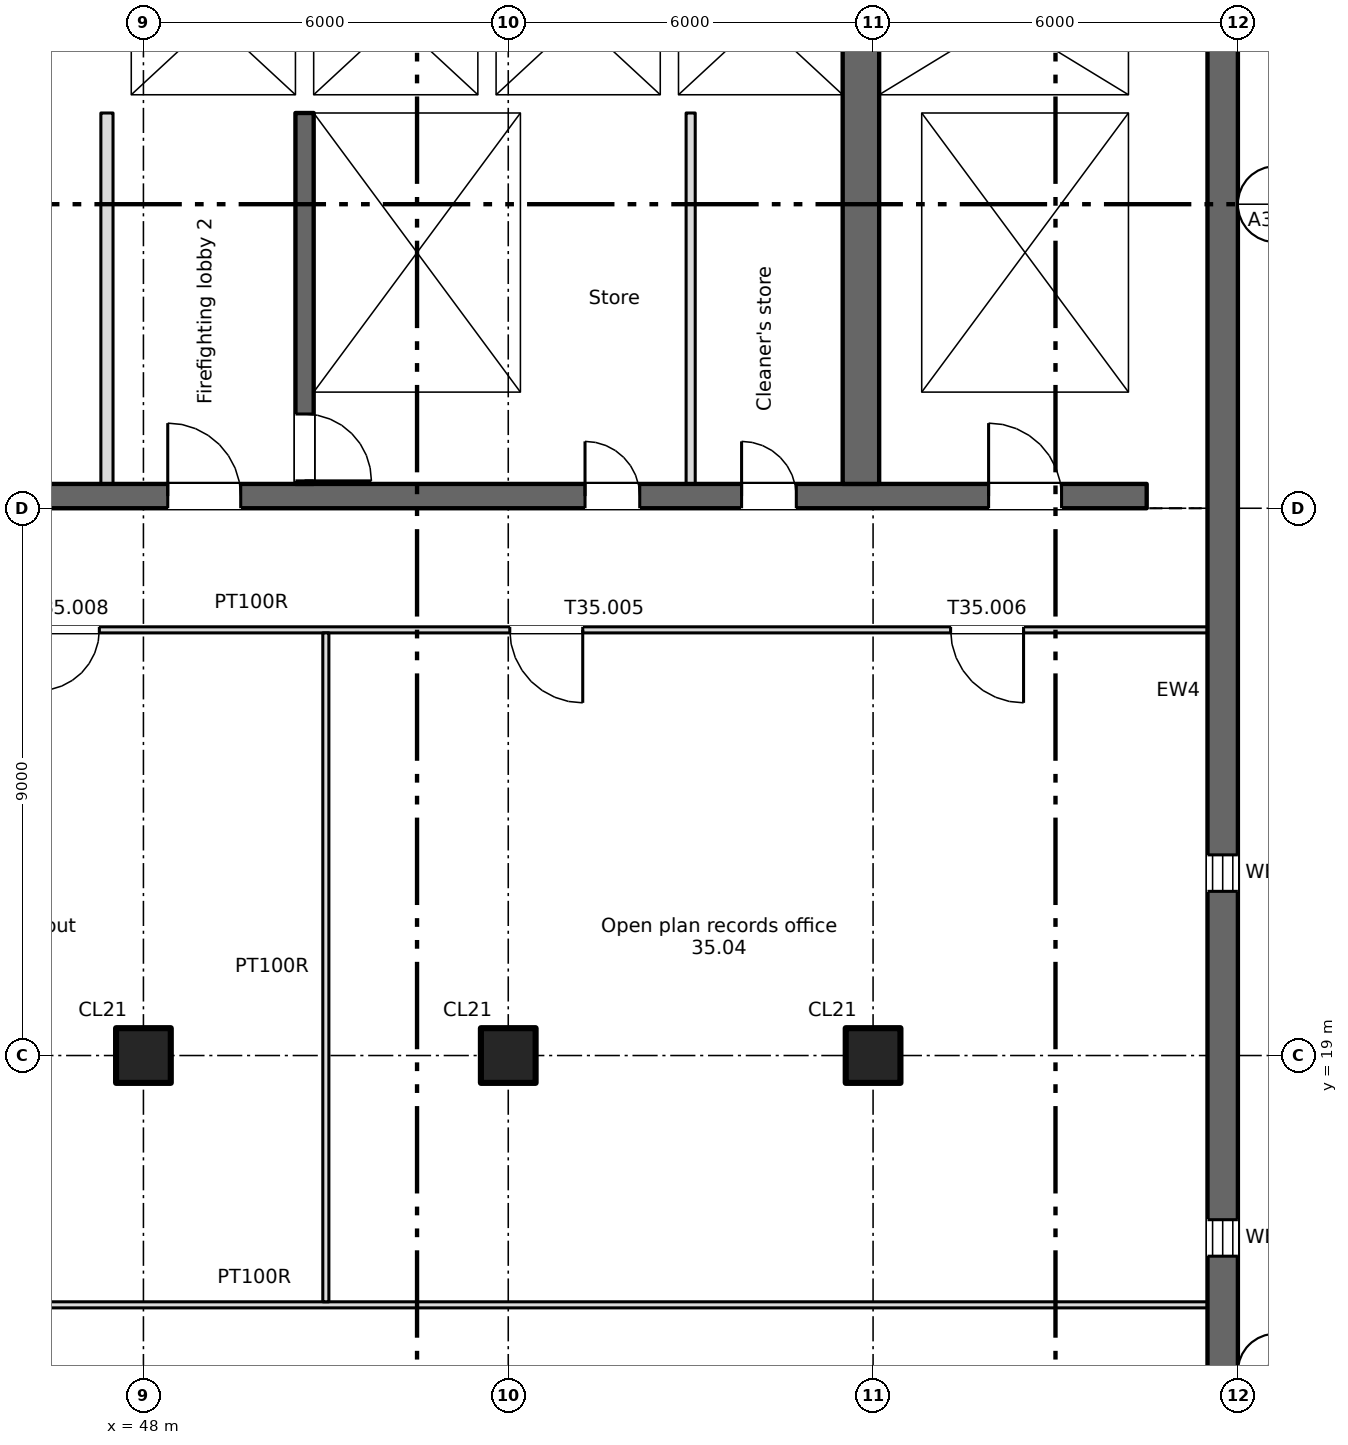
"""IFC4 building model, lengths in metres.
Left out: names, types, materials, properties, quantities, classifications, styles, units other than length and angle.
Written with IfcOpenShell. Run it as: python <this file> out.ifc"""

import sys

from ifc_helpers import new_model, si_unit, direction, frame, frame_2d, origin, origin_2d, place, context, subcontext, project, spatial, rectangle, extrude, element, fill, save


model = new_model("IFC4")
c1 = context("Model", 3, precision=1e-05, world=origin(), true_north=direction((0.0, 1.0)))
c2 = subcontext(c1, "Body", "Model", "MODEL_VIEW")
j1 = project(units=[si_unit("LENGTHUNIT", "METRE"), si_unit("PLANEANGLEUNIT", "RADIAN")], contexts=[c1])
p1 = place(None, origin())
s1 = spatial("IfcSite", under=j1, at=p1, CompositionType="ELEMENT")
p2 = place(p1, origin())
s2 = spatial("IfcBuilding", under=s1, at=p2, CompositionType="ELEMENT")
p3 = place(p2, frame((0.0, 0.0, 243.15)))
s3 = spatial("IfcBuildingStorey", under=s2, at=p3, CompositionType="ELEMENT", Elevation=243.15)
for number, where, z_axis, x_axis in (
    (1, (48.0, 19.0, 0.0), (0.0, 0.0, 1.0), (1.0, 0.0, 0.0)),
    (2, (54.0, 19.0, 0.0), (0.0, 0.0, 1.0), (1.0, 0.0, 0.0)),
    (3, (60.0, 19.0, 0.0), (0.0, 0.0, 1.0), (1.0, 0.0, 0.0)),
):
    element("IfcColumn", number, at=place(p3, frame(where, z_axis=z_axis, x_axis=x_axis)), inside=s3, PredefinedType="COLUMN", context=c2, shape_type="SweptSolid", body=[
        extrude(rectangle(XDim=0.9, YDim=0.9, at=origin_2d()), origin(), (0.0, 0.0, 1.0), 3.4),
    ])
p4 = place(p3, frame((65.75, 8.5, 0.0), z_axis=(0.0, 0.0, 1.0), x_axis=(0.0, 1.0, 0.0)))
e4 = element("IfcWall", 4, at=p4, inside=s3, PredefinedType="SHEAR", context=c2, shape_type="SweptSolid", body=[
    extrude(rectangle(XDim=33.0, YDim=0.5, at=frame_2d((16.5, 0.0))), origin(), (0.0, 0.0, 1.0), 3.4),
])
p5 = place(p4, frame((1.2, 0.0, 0.6)))
e5 = element("IfcOpeningElement", 5, at=p5, cuts=e4, PredefinedType="OPENING", context=c2, shape_type="SweptSolid", body=[
    extrude(rectangle(XDim=0.6, YDim=2.4, at=frame_2d((0.3, 1.2))), frame((0.0, 0.26, 0.0), z_axis=(0.0, -1.0, 0.0), x_axis=(1.0, 0.0, 0.0)), (0.0, 0.0, 1.0), 0.52),
])
p6 = place(p4, frame((7.2, 0.0, 0.6)))
e6 = element("IfcOpeningElement", 6, at=p6, cuts=e4, PredefinedType="OPENING", context=c2, shape_type="SweptSolid", body=[
    extrude(rectangle(XDim=0.6, YDim=2.4, at=frame_2d((0.3, 1.2))), frame((0.0, 0.26, 0.0), z_axis=(0.0, -1.0, 0.0), x_axis=(1.0, 0.0, 0.0)), (0.0, 0.0, 1.0), 0.52),
])
p7 = place(p4, frame((13.2, 0.0, 0.6)))
e7 = element("IfcOpeningElement", 7, at=p7, cuts=e4, PredefinedType="OPENING", context=c2, shape_type="SweptSolid", body=[
    extrude(rectangle(XDim=0.6, YDim=2.4, at=frame_2d((0.3, 1.2))), frame((0.0, 0.26, 0.0), z_axis=(0.0, -1.0, 0.0), x_axis=(1.0, 0.0, 0.0)), (0.0, 0.0, 1.0), 0.52),
])
p8 = place(p3, frame((6.5, 28.2, 0.0), z_axis=(0.0, 0.0, 1.0), x_axis=(1.0, 0.0, 0.0)))
e8 = element("IfcWall", 8, at=p8, inside=s3, PredefinedType="SHEAR", context=c2, shape_type="SweptSolid", body=[
    extrude(rectangle(XDim=58.0, YDim=0.4, at=frame_2d((29.0, 0.0))), origin(), (0.0, 0.0, 1.0), 3.4),
])
p9 = place(p8, frame((14.05, 0.0, 0.0)))
e9 = element("IfcOpeningElement", 9, at=p9, cuts=e8, PredefinedType="OPENING", context=c2, shape_type="SweptSolid", body=[
    extrude(rectangle(XDim=0.9, YDim=2.1, at=frame_2d((0.45, 1.05))), frame((0.0, 0.21, 0.0), z_axis=(0.0, -1.0, 0.0), x_axis=(1.0, 0.0, 0.0)), (0.0, 0.0, 1.0), 0.42),
])
p10 = place(p8, frame((48.762, 0.0, 0.0)))
e10 = element("IfcOpeningElement", 10, at=p10, cuts=e8, PredefinedType="OPENING", context=c2, shape_type="SweptSolid", body=[
    extrude(rectangle(XDim=0.9, YDim=2.1, at=frame_2d((0.45, 1.05))), frame((0.0, 0.21, 0.0), z_axis=(0.0, -1.0, 0.0), x_axis=(1.0, 0.0, 0.0)), (0.0, 0.0, 1.0), 0.42),
])
p11 = place(p8, frame((51.337, 0.0, 0.0)))
e11 = element("IfcOpeningElement", 11, at=p11, cuts=e8, PredefinedType="OPENING", context=c2, shape_type="SweptSolid", body=[
    extrude(rectangle(XDim=0.9, YDim=2.1, at=frame_2d((0.45, 1.05))), frame((0.0, 0.21, 0.0), z_axis=(0.0, -1.0, 0.0), x_axis=(1.0, 0.0, 0.0)), (0.0, 0.0, 1.0), 0.42),
])
p12 = place(p8, frame((1.55, 0.0, 0.0)))
e12 = element("IfcOpeningElement", 12, at=p12, cuts=e8, PredefinedType="OPENING", context=c2, shape_type="SweptSolid", body=[
    extrude(rectangle(XDim=0.9, YDim=2.1, at=frame_2d((0.45, 1.05))), frame((0.0, 0.21, 0.0), z_axis=(0.0, -1.0, 0.0), x_axis=(1.0, 0.0, 0.0)), (0.0, 0.0, 1.0), 0.42),
])
p13 = place(p8, frame((4.9, 0.0, 0.0)))
e13 = element("IfcOpeningElement", 13, at=p13, cuts=e8, PredefinedType="OPENING", context=c2, shape_type="SweptSolid", body=[
    extrude(rectangle(XDim=1.2, YDim=2.1, at=frame_2d((0.6, 1.05))), frame((0.0, 0.21, 0.0), z_axis=(0.0, -1.0, 0.0), x_axis=(1.0, 0.0, 0.0)), (0.0, 0.0, 1.0), 0.42),
])
p14 = place(p8, frame((31.9, 0.0, 0.0)))
e14 = element("IfcOpeningElement", 14, at=p14, cuts=e8, PredefinedType="OPENING", context=c2, shape_type="SweptSolid", body=[
    extrude(rectangle(XDim=1.2, YDim=2.1, at=frame_2d((0.6, 1.05))), frame((0.0, 0.21, 0.0), z_axis=(0.0, -1.0, 0.0), x_axis=(1.0, 0.0, 0.0)), (0.0, 0.0, 1.0), 0.42),
])
p15 = place(p8, frame((55.4, 0.0, 0.0)))
e15 = element("IfcOpeningElement", 15, at=p15, cuts=e8, PredefinedType="OPENING", context=c2, shape_type="SweptSolid", body=[
    extrude(rectangle(XDim=1.2, YDim=2.1, at=frame_2d((0.6, 1.05))), frame((0.0, 0.21, 0.0), z_axis=(0.0, -1.0, 0.0), x_axis=(1.0, 0.0, 0.0)), (0.0, 0.0, 1.0), 0.42),
])
p16 = place(p8, frame((21.9, 0.0, 0.0)))
e16 = element("IfcOpeningElement", 16, at=p16, cuts=e8, PredefinedType="OPENING", context=c2, shape_type="SweptSolid", body=[
    extrude(rectangle(XDim=1.2, YDim=2.1, at=frame_2d((0.6, 1.05))), frame((0.0, 0.21, 0.0), z_axis=(0.0, -1.0, 0.0), x_axis=(1.0, 0.0, 0.0)), (0.0, 0.0, 1.0), 0.42),
])
p17 = place(p8, frame((41.9, 0.0, 0.0)))
e17 = element("IfcOpeningElement", 17, at=p17, cuts=e8, PredefinedType="OPENING", context=c2, shape_type="SweptSolid", body=[
    extrude(rectangle(XDim=1.2, YDim=2.1, at=frame_2d((0.6, 1.05))), frame((0.0, 0.21, 0.0), z_axis=(0.0, -1.0, 0.0), x_axis=(1.0, 0.0, 0.0)), (0.0, 0.0, 1.0), 0.42),
])
p18 = place(p8, frame((25.05, 0.0, 0.0)))
e18 = element("IfcOpeningElement", 18, at=p18, cuts=e8, PredefinedType="OPENING", context=c2, shape_type="SweptSolid", body=[
    extrude(rectangle(XDim=2.4, YDim=2.1, at=frame_2d((1.2, 1.05))), frame((0.0, 0.21, 0.0), z_axis=(0.0, -1.0, 0.0), x_axis=(1.0, 0.0, 0.0)), (0.0, 0.0, 1.0), 0.42),
])
p19 = place(p8, frame((37.55, 0.0, 0.0)))
e19 = element("IfcOpeningElement", 19, at=p19, cuts=e8, PredefinedType="OPENING", context=c2, shape_type="SweptSolid", body=[
    extrude(rectangle(XDim=2.4, YDim=2.1, at=frame_2d((1.2, 1.05))), frame((0.0, 0.21, 0.0), z_axis=(0.0, -1.0, 0.0), x_axis=(1.0, 0.0, 0.0)), (0.0, 0.0, 1.0), 0.42),
])
p20 = place(p8, frame((8.25, 0.0, 0.0)))
e20 = element("IfcOpeningElement", 20, at=p20, cuts=e8, PredefinedType="OPENING", context=c2, shape_type="SweptSolid", body=[
    extrude(rectangle(XDim=2.4, YDim=2.1, at=frame_2d((1.2, 1.05))), frame((0.0, 0.21, 0.0), z_axis=(0.0, -1.0, 0.0), x_axis=(1.0, 0.0, 0.0)), (0.0, 0.0, 1.0), 0.42),
])
p21 = place(p8, frame((29.05, 0.0, 0.0)))
e21 = element("IfcOpeningElement", 21, at=p21, cuts=e8, PredefinedType="OPENING", context=c2, shape_type="SweptSolid", body=[
    extrude(rectangle(XDim=0.9, YDim=2.1, at=frame_2d((0.45, 1.05))), frame((0.0, 0.21, 0.0), z_axis=(0.0, -1.0, 0.0), x_axis=(1.0, 0.0, 0.0)), (0.0, 0.0, 1.0), 0.42),
])
p22 = place(p8, frame((35.05, 0.0, 0.0)))
e22 = element("IfcOpeningElement", 22, at=p22, cuts=e8, PredefinedType="OPENING", context=c2, shape_type="SweptSolid", body=[
    extrude(rectangle(XDim=0.9, YDim=2.1, at=frame_2d((0.45, 1.05))), frame((0.0, 0.21, 0.0), z_axis=(0.0, -1.0, 0.0), x_axis=(1.0, 0.0, 0.0)), (0.0, 0.0, 1.0), 0.42),
])
p23 = place(p3, frame((64.35, 34.8, 0.0), z_axis=(0.0, 0.0, 1.0), x_axis=(0.0, 1.0, 0.0)))
e23 = element("IfcWall", 23, at=p23, inside=s3, PredefinedType="SHEAR", context=c2, shape_type="SweptSolid", body=[
    extrude(rectangle(XDim=6.45, YDim=0.3, at=frame_2d((3.225, 0.0))), origin(), (0.0, 0.0, 1.0), 3.4),
])
p24 = place(p3, frame((59.8, 28.4, 0.0), z_axis=(0.0, 0.0, 1.0), x_axis=(0.0, 1.0, 0.0)))
e24 = element("IfcWall", 24, at=p24, inside=s3, PredefinedType="SHEAR", context=c2, shape_type="SweptSolid", body=[
    extrude(rectangle(XDim=15.1, YDim=0.6, at=frame_2d((7.55, 0.0))), origin(), (0.0, 0.0, 1.0), 3.4),
])
p25 = place(p24, frame((9.6, 0.0, 0.0)))
e25 = element("IfcOpeningElement", 25, at=p25, cuts=e24, PredefinedType="OPENING", context=c2, shape_type="SweptSolid", body=[
    extrude(rectangle(XDim=2.0, YDim=2.1, at=frame_2d((1.0, 1.05))), frame((0.0, 0.31, 0.0), z_axis=(0.0, -1.0, 0.0), x_axis=(1.0, 0.0, 0.0)), (0.0, 0.0, 1.0), 0.62),
])
p26 = place(p3, frame((50.65, 34.5, 0.0), z_axis=(0.0, 0.0, 1.0), x_axis=(0.0, -1.0, 0.0)))
e26 = element("IfcWall", 26, at=p26, inside=s3, PredefinedType="SHEAR", context=c2, shape_type="SweptSolid", body=[
    extrude(rectangle(XDim=6.1, YDim=0.3, at=frame_2d((3.05, 0.0))), origin(), (0.0, 0.0, 1.0), 3.4),
])
p27 = place(p26, frame((4.95, 0.0, 0.0)))
e27 = element("IfcOpeningElement", 27, at=p27, cuts=e26, PredefinedType="OPENING", context=c2, shape_type="SweptSolid", body=[
    extrude(rectangle(XDim=1.1, YDim=2.1, at=frame_2d((0.55, 1.05))), frame((0.0, 0.16, 0.0), z_axis=(0.0, -1.0, 0.0), x_axis=(1.0, 0.0, 0.0)), (0.0, 0.0, 1.0), 0.32),
])
p28 = place(p3, frame((54.35, 28.4, 0.0), z_axis=(0.0, 0.0, 1.0), x_axis=(0.0, 1.0, 0.0)))
e28 = element("IfcWall", 28, at=p28, inside=s3, PredefinedType="SHEAR", context=c2, shape_type="SweptSolid", body=[
    extrude(rectangle(XDim=6.1, YDim=0.3, at=frame_2d((3.05, 0.0))), origin(), (0.0, 0.0, 1.0), 3.4),
])
p29 = place(p3, frame((60.45, 28.4, 0.0), z_axis=(0.0, 0.0, 1.0), x_axis=(0.0, 1.0, 0.0)))
e29 = element("IfcWall", 29, at=p29, inside=s3, PredefinedType="SHEAR", context=c2, shape_type="SweptSolid", body=[
    extrude(rectangle(XDim=6.1, YDim=0.7, at=frame_2d((3.05, 0.0))), origin(), (0.0, 0.0, 1.0), 3.4),
])
p30 = place(p3, frame((64.35, 28.4, 0.0), z_axis=(0.0, 0.0, 1.0), x_axis=(0.0, 1.0, 0.0)))
e30 = element("IfcWall", 30, at=p30, inside=s3, PredefinedType="SHEAR", context=c2, shape_type="SweptSolid", body=[
    extrude(rectangle(XDim=6.1, YDim=0.3, at=frame_2d((3.05, 0.0))), origin(), (0.0, 0.0, 1.0), 3.4),
])
p31 = place(p3, frame((47.3, 34.65, 0.0), z_axis=(0.0, 0.0, 1.0), x_axis=(1.0, 0.0, 0.0)))
e31 = element("IfcWall", 31, at=p31, inside=s3, PredefinedType="SHEAR", context=c2, shape_type="SweptSolid", body=[
    extrude(rectangle(XDim=12.2, YDim=0.3, at=frame_2d((6.1, 0.0))), origin(), (0.0, 0.0, 1.0), 3.4),
])
p32 = place(p31, frame((1.3, 0.0, 0.0)))
e32 = element("IfcOpeningElement", 32, at=p32, cuts=e31, PredefinedType="OPENING", context=c2, shape_type="SweptSolid", body=[
    extrude(rectangle(XDim=1.1, YDim=2.1, at=frame_2d((0.55, 1.05))), frame((0.0, 0.16, 0.0), z_axis=(0.0, -1.0, 0.0), x_axis=(1.0, 0.0, 0.0)), (0.0, 0.0, 1.0), 0.32),
])
p33 = place(p3, frame((60.1, 34.65, 0.0), z_axis=(0.0, 0.0, 1.0), x_axis=(1.0, 0.0, 0.0)))
e33 = element("IfcWall", 33, at=p33, inside=s3, PredefinedType="SHEAR", context=c2, shape_type="SweptSolid", body=[
    extrude(rectangle(XDim=4.4, YDim=0.3, at=frame_2d((2.2, 0.0))), origin(), (0.0, 0.0, 1.0), 3.4),
])
p34 = place(p3, frame((47.55, 34.8, 0.0), z_axis=(0.0, 0.0, 1.0), x_axis=(0.0, 1.0, 0.0)))
e34 = element("IfcWall", 34, at=p34, inside=s3, PredefinedType="SHEAR", context=c2, shape_type="SweptSolid", body=[
    extrude(rectangle(XDim=2.5, YDim=0.5, at=frame_2d((1.25, 0.0))), origin(), (0.0, 0.0, 1.0), 3.4),
])
for number, where, z_axis, x_axis in (
    (35, (50.65, 34.8, 0.0), (0.0, 0.0, 1.0), (0.0, 1.0, 0.0)),
    (36, (53.65, 34.8, 0.0), (0.0, 0.0, 1.0), (0.0, 1.0, 0.0)),
    (37, (56.65, 34.8, 0.0), (0.0, 0.0, 1.0), (0.0, 1.0, 0.0)),
):
    element("IfcWall", number, at=place(p3, frame(where, z_axis=z_axis, x_axis=x_axis)), inside=s3, PredefinedType="SHEAR", context=c2, shape_type="SweptSolid", body=[
        extrude(rectangle(XDim=2.5, YDim=0.3, at=frame_2d((1.25, 0.0))), origin(), (0.0, 0.0, 1.0), 3.4),
    ])
p35 = place(p3, frame((47.4, 28.4, 0.0), z_axis=(0.0, 0.0, 1.0), x_axis=(0.0, 1.0, 0.0)))
e38 = element("IfcWall", 38, at=p35, inside=s3, PredefinedType="PARTITIONING", context=c2, shape_type="SweptSolid", body=[
    extrude(rectangle(XDim=6.1, YDim=0.2, at=frame_2d((3.05, 0.0))), origin(), (0.0, 0.0, 1.0), 3.4),
])
p36 = place(p3, frame((57.0, 28.4, 0.0), z_axis=(0.0, 0.0, 1.0), x_axis=(0.0, 1.0, 0.0)))
e39 = element("IfcWall", 39, at=p36, inside=s3, PredefinedType="PARTITIONING", context=c2, shape_type="SweptSolid", body=[
    extrude(rectangle(XDim=6.1, YDim=0.15, at=frame_2d((3.05, 0.0))), origin(), (0.0, 0.0, 1.0), 3.4),
])
p37 = place(p3, frame((34.15, 14.9, 0.0), z_axis=(0.0, 0.0, 1.0), x_axis=(1.0, 0.0, 0.0)))
e40 = element("IfcWall", 40, at=p37, inside=s3, PredefinedType="PARTITIONING", context=c2, shape_type="SweptSolid", body=[
    extrude(rectangle(XDim=31.35, YDim=0.1, at=frame_2d((15.675, 0.0))), origin(), (0.0, 0.0, 1.0), 3.4),
])
p38 = place(p3, frame((34.05, 26.0, 0.0), z_axis=(0.0, 0.0, 1.0), x_axis=(1.0, 0.0, 0.0)))
e41 = element("IfcWall", 41, at=p38, inside=s3, PredefinedType="PARTITIONING", context=c2, shape_type="SweptSolid", body=[
    extrude(rectangle(XDim=31.45, YDim=0.1, at=frame_2d((15.725, 0.0))), origin(), (0.0, 0.0, 1.0), 3.4),
])
p39 = place(p38, frame((19.975, 0.0, 0.0)))
e42 = element("IfcOpeningElement", 42, at=p39, cuts=e41, PredefinedType="OPENING", context=c2, shape_type="SweptSolid", body=[
    extrude(rectangle(XDim=1.2, YDim=2.1, at=frame_2d((0.6, 1.05))), frame((0.0, 0.06, 0.0), z_axis=(0.0, -1.0, 0.0), x_axis=(1.0, 0.0, 0.0)), (0.0, 0.0, 1.0), 0.12),
])
p40 = place(p38, frame((27.225, 0.0, 0.0)))
e43 = element("IfcOpeningElement", 43, at=p40, cuts=e41, PredefinedType="OPENING", context=c2, shape_type="SweptSolid", body=[
    extrude(rectangle(XDim=1.2, YDim=2.1, at=frame_2d((0.6, 1.05))), frame((0.0, 0.06, 0.0), z_axis=(0.0, -1.0, 0.0), x_axis=(1.0, 0.0, 0.0)), (0.0, 0.0, 1.0), 0.12),
])
p41 = place(p38, frame((3.775, 0.0, 0.0)))
e44 = element("IfcOpeningElement", 44, at=p41, cuts=e41, PredefinedType="OPENING", context=c2, shape_type="SweptSolid", body=[
    extrude(rectangle(XDim=1.0, YDim=2.1, at=frame_2d((0.5, 1.05))), frame((0.0, 0.06, 0.0), z_axis=(0.0, -1.0, 0.0), x_axis=(1.0, 0.0, 0.0)), (0.0, 0.0, 1.0), 0.12),
])
p42 = place(p38, frame((12.225, 0.0, 0.0)))
e45 = element("IfcOpeningElement", 45, at=p42, cuts=e41, PredefinedType="OPENING", context=c2, shape_type="SweptSolid", body=[
    extrude(rectangle(XDim=1.0, YDim=2.1, at=frame_2d((0.5, 1.05))), frame((0.0, 0.06, 0.0), z_axis=(0.0, -1.0, 0.0), x_axis=(1.0, 0.0, 0.0)), (0.0, 0.0, 1.0), 0.12),
])
p43 = place(p3, frame((51.0, 14.95, 0.0), z_axis=(0.0, 0.0, 1.0), x_axis=(0.0, 1.0, 0.0)))
e46 = element("IfcWall", 46, at=p43, inside=s3, PredefinedType="PARTITIONING", context=c2, shape_type="SweptSolid", body=[
    extrude(rectangle(XDim=11.0, YDim=0.1, at=frame_2d((5.5, 0.0))), origin(), (0.0, 0.0, 1.0), 3.4),
])
p44 = place(p6, origin())
e47 = element("IfcWindow", 47, at=p44, inside=s3, PartitioningType="SINGLE_PANEL", PredefinedType="WINDOW", context=c2, shape_type="SweptSolid", body=[
    extrude(rectangle(XDim=0.6, YDim=2.4, at=frame_2d((0.3, 1.2))), frame((0.0, 0.03, 0.0), z_axis=(0.0, -1.0, 0.0), x_axis=(1.0, 0.0, 0.0)), (0.0, 0.0, 1.0), 0.06),
])
fill(e6, e47)
p45 = place(p7, origin())
e48 = element("IfcWindow", 48, at=p45, inside=s3, PartitioningType="SINGLE_PANEL", PredefinedType="WINDOW", context=c2, shape_type="SweptSolid", body=[
    extrude(rectangle(XDim=0.6, YDim=2.4, at=frame_2d((0.3, 1.2))), frame((0.0, 0.03, 0.0), z_axis=(0.0, -1.0, 0.0), x_axis=(1.0, 0.0, 0.0)), (0.0, 0.0, 1.0), 0.06),
])
fill(e7, e48)
p46 = place(p10, origin())
e49 = element("IfcDoor", 49, at=p46, inside=s3, OperationType="SINGLE_SWING_LEFT", PredefinedType="DOOR", context=c2, shape_type="SweptSolid", body=[
    extrude(rectangle(XDim=0.9, YDim=2.1, at=frame_2d((0.45, 1.05))), frame((0.0, 0.025, 0.0), z_axis=(0.0, -1.0, 0.0), x_axis=(1.0, 0.0, 0.0)), (0.0, 0.0, 1.0), 0.05),
])
fill(e10, e49)
p47 = place(p11, origin())
e50 = element("IfcDoor", 50, at=p47, inside=s3, OperationType="SINGLE_SWING_LEFT", PredefinedType="DOOR", context=c2, shape_type="SweptSolid", body=[
    extrude(rectangle(XDim=0.9, YDim=2.1, at=frame_2d((0.45, 1.05))), frame((0.0, 0.025, 0.0), z_axis=(0.0, -1.0, 0.0), x_axis=(1.0, 0.0, 0.0)), (0.0, 0.0, 1.0), 0.05),
])
fill(e11, e50)
p48 = place(p32, origin())
e51 = element("IfcDoor", 51, at=p48, inside=s3, OperationType="SLIDING_TO_LEFT", PredefinedType="DOOR", context=c2, shape_type="SweptSolid", body=[
    extrude(rectangle(XDim=1.1, YDim=2.1, at=frame_2d((0.55, 1.05))), frame((0.0, 0.025, 0.0), z_axis=(0.0, -1.0, 0.0), x_axis=(1.0, 0.0, 0.0)), (0.0, 0.0, 1.0), 0.05),
])
fill(e32, e51)
p49 = place(p27, origin())
e52 = element("IfcDoor", 52, at=p49, inside=s3, OperationType="SINGLE_SWING_RIGHT", PredefinedType="DOOR", context=c2, shape_type="SweptSolid", body=[
    extrude(rectangle(XDim=1.1, YDim=2.1, at=frame_2d((0.55, 1.05))), frame((0.0, 0.025, 0.0), z_axis=(0.0, -1.0, 0.0), x_axis=(1.0, 0.0, 0.0)), (0.0, 0.0, 1.0), 0.05),
])
fill(e27, e52)
p50 = place(p15, origin())
e53 = element("IfcDoor", 53, at=p50, inside=s3, OperationType="SINGLE_SWING_LEFT", PredefinedType="DOOR", context=c2, shape_type="SweptSolid", body=[
    extrude(rectangle(XDim=1.2, YDim=2.1, at=frame_2d((0.6, 1.05))), frame((0.0, 0.025, 0.0), z_axis=(0.0, -1.0, 0.0), x_axis=(1.0, 0.0, 0.0)), (0.0, 0.0, 1.0), 0.05),
])
fill(e15, e53)
p51 = place(p17, origin())
e54 = element("IfcDoor", 54, at=p51, inside=s3, OperationType="SINGLE_SWING_LEFT", PredefinedType="DOOR", context=c2, shape_type="SweptSolid", body=[
    extrude(rectangle(XDim=1.2, YDim=2.1, at=frame_2d((0.6, 1.05))), frame((0.0, 0.025, 0.0), z_axis=(0.0, -1.0, 0.0), x_axis=(1.0, 0.0, 0.0)), (0.0, 0.0, 1.0), 0.05),
])
fill(e17, e54)
p52 = place(p39, origin())
e55 = element("IfcDoor", 55, at=p52, inside=s3, OperationType="SINGLE_SWING_RIGHT", PredefinedType="DOOR", context=c2, shape_type="SweptSolid", body=[
    extrude(rectangle(XDim=1.2, YDim=2.1, at=frame_2d((0.6, 1.05))), frame((0.0, 0.025, 0.0), z_axis=(0.0, -1.0, 0.0), x_axis=(1.0, 0.0, 0.0)), (0.0, 0.0, 1.0), 0.05),
])
fill(e42, e55)
p53 = place(p40, origin())
e56 = element("IfcDoor", 56, at=p53, inside=s3, OperationType="SINGLE_SWING_RIGHT", PredefinedType="DOOR", context=c2, shape_type="SweptSolid", body=[
    extrude(rectangle(XDim=1.2, YDim=2.1, at=frame_2d((0.6, 1.05))), frame((0.0, 0.025, 0.0), z_axis=(0.0, -1.0, 0.0), x_axis=(1.0, 0.0, 0.0)), (0.0, 0.0, 1.0), 0.05),
])
fill(e43, e56)
p54 = place(p42, origin())
e57 = element("IfcDoor", 57, at=p54, inside=s3, OperationType="SINGLE_SWING_LEFT", PredefinedType="DOOR", context=c2, shape_type="SweptSolid", body=[
    extrude(rectangle(XDim=1.0, YDim=2.1, at=frame_2d((0.5, 1.05))), frame((0.0, 0.025, 0.0), z_axis=(0.0, -1.0, 0.0), x_axis=(1.0, 0.0, 0.0)), (0.0, 0.0, 1.0), 0.05),
])
fill(e45, e57)
save(model, sys.argv[1])
